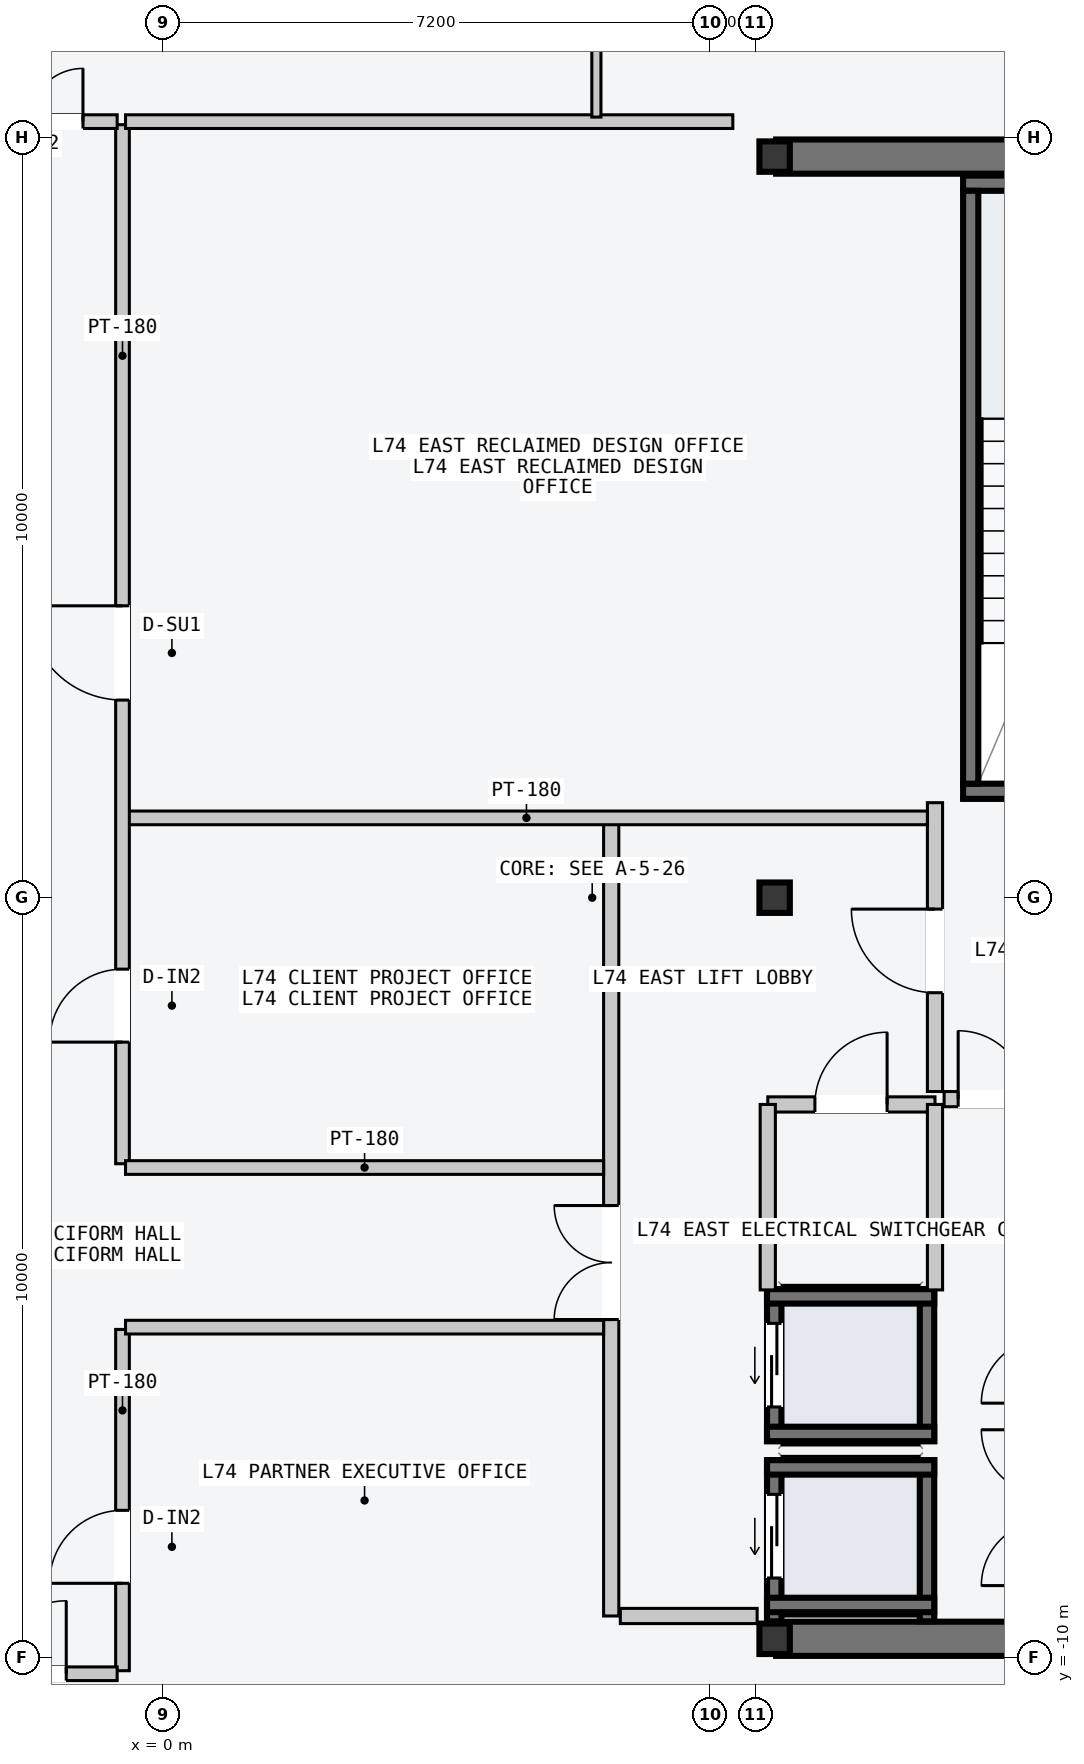
"""IFC4 building model, lengths in metres.
Left out: names, types, materials, properties, quantities, classifications, styles, units other than length and angle.
Written with IfcOpenShell. Run it as: python <this file> out.ifc"""

import sys

from ifc_helpers import new_model, si_unit, direction, frame, frame_2d, origin, origin_2d, place, context, subcontext, project, spatial, rectangle, i_section, extrude, element, fill, save


model = new_model("IFC4")
c1 = context("Model", 3, precision=1e-05, world=origin(), true_north=direction((0.0, 1.0)))
c2 = subcontext(c1, "Body", "Model", "MODEL_VIEW")
j1 = project(units=[si_unit("LENGTHUNIT", "METRE"), si_unit("PLANEANGLEUNIT", "RADIAN")], contexts=[c1])
p1 = place(None, origin())
s1 = spatial("IfcSite", under=j1, at=p1, CompositionType="ELEMENT")
p2 = place(p1, origin())
s2 = spatial("IfcBuilding", under=s1, at=p2, CompositionType="ELEMENT")
p3 = place(p2, frame((0.0, 0.0, 280.8)))
s3 = spatial("IfcBuildingStorey", under=s2, at=p3, CompositionType="ELEMENT", Elevation=280.8)
for number, where, z_axis, x_axis in (
    (1, (8.07, -9.75, -0.2), (0.0, 0.0, 1.0), (1.0, 0.0, 0.0)),
    (2, (8.07, 9.75, -0.2), (0.0, 0.0, 1.0), (1.0, 0.0, 0.0)),
):
    element("IfcWall", number, at=place(p3, frame(where, z_axis=z_axis, x_axis=x_axis)), inside=s3, PredefinedType="SHEAR", context=c2, shape_type="SweptSolid", body=[
        extrude(rectangle(XDim=6.46, YDim=0.45, at=frame_2d((3.23, 0.0))), origin(), (0.0, 0.0, 1.0), 3.6),
    ])
p4 = place(p3, frame((10.53, 1.4, -0.2), z_axis=(0.0, 0.0, 1.0), x_axis=(1.0, 0.0, 0.0)))
e3 = element("IfcWall", 3, at=p4, inside=s3, PredefinedType="SOLIDWALL", context=c2, shape_type="SweptSolid", body=[
    extrude(rectangle(XDim=3.72, YDim=0.2, at=frame_2d((1.86, 0.0))), origin(), (0.0, 0.0, 1.0), 3.6),
])
p5 = place(p4, frame((1.5, 0.0, 0.2)))
e4 = element("IfcOpeningElement", 4, at=p5, cuts=e3, PredefinedType="OPENING", context=c2, shape_type="SweptSolid", body=[
    extrude(rectangle(XDim=1.12, YDim=2.18, at=frame_2d((0.56, 1.09))), frame((0.0, 0.11, 0.0), z_axis=(0.0, -1.0, 0.0), x_axis=(1.0, 0.0, 0.0)), (0.0, 0.0, 1.0), 0.22),
])
p6 = place(p3, frame((10.53, 9.4, -0.2), z_axis=(0.0, 0.0, 1.0), x_axis=(1.0, 0.0, 0.0)))
e5 = element("IfcWall", 5, at=p6, inside=s3, PredefinedType="SOLIDWALL", context=c2, shape_type="SweptSolid", body=[
    extrude(rectangle(XDim=3.72, YDim=0.2, at=frame_2d((1.86, 0.0))), origin(), (0.0, 0.0, 1.0), 3.6),
])
p7 = place(p3, frame((10.63, 1.5, -0.2), z_axis=(0.0, 0.0, 1.0), x_axis=(0.0, 1.0, 0.0)))
e6 = element("IfcWall", 6, at=p7, inside=s3, PredefinedType="SOLIDWALL", context=c2, shape_type="SweptSolid", body=[
    extrude(rectangle(XDim=7.8, YDim=0.2, at=frame_2d((3.9, 0.0))), origin(), (0.0, 0.0, 1.0), 3.6),
])
for number, where, z_axis, x_axis in (
    (7, (8.05, -9.75, 0.0), (0.0, 0.0, 1.0), (1.0, 0.0, 0.0)),
    (8, (8.05, 0.0, 0.0), (0.0, 0.0, 1.0), (1.0, 0.0, 0.0)),
    (9, (8.05, 9.75, 0.0), (0.0, 0.0, 1.0), (1.0, 0.0, 0.0)),
):
    element("IfcColumn", number, at=place(p3, frame(where, z_axis=z_axis, x_axis=x_axis)), inside=s3, PredefinedType="COLUMN", context=c2, shape_type="SweptSolid", body=[
        extrude(i_section(OverallWidth=0.4, OverallDepth=0.4, WebThickness=0.013, FlangeThickness=0.021, at=origin_2d()), origin(), (0.0, 0.0, 1.0), 3.6),
    ])
p8 = place(p3, frame((8.045, -9.52, -0.2), z_axis=(0.0, 0.0, 1.0), x_axis=(0.0, 1.0, 0.0)))
e10 = element("IfcWall", 10, at=p8, inside=s3, PredefinedType="SOLIDWALL", context=c2, shape_type="SweptSolid", body=[
    extrude(rectangle(XDim=2.12, YDim=0.19, at=frame_2d((1.06, 0.0))), origin(), (0.0, 0.0, 1.0), 3.6),
])
p9 = place(p8, frame((0.57, 0.0, 0.2)))
e11 = element("IfcOpeningElement", 11, at=p9, cuts=e10, PredefinedType="OPENING", context=c2, shape_type="SweptSolid", body=[
    extrude(rectangle(XDim=1.1, YDim=2.2, at=frame_2d((0.55, 1.1))), frame((0.0, 0.105, 0.0), z_axis=(0.0, -1.0, 0.0), x_axis=(1.0, 0.0, 0.0)), (0.0, 0.0, 1.0), 0.21),
])
p10 = place(p3, frame((10.055, -9.52, -0.2), z_axis=(0.0, 0.0, 1.0), x_axis=(0.0, 1.0, 0.0)))
e12 = element("IfcWall", 12, at=p10, inside=s3, PredefinedType="SOLIDWALL", context=c2, shape_type="SweptSolid", body=[
    extrude(rectangle(XDim=2.12, YDim=0.19, at=frame_2d((1.06, 0.0))), origin(), (0.0, 0.0, 1.0), 3.6),
])
for number, where, z_axis, x_axis in (
    (13, (7.95, -7.495, -0.2), (0.0, 0.0, 1.0), (1.0, 0.0, 0.0)),
    (14, (7.95, -9.305, -0.2), (0.0, 0.0, 1.0), (1.0, 0.0, 0.0)),
):
    element("IfcWall", number, at=place(p3, frame(where, z_axis=z_axis, x_axis=x_axis)), inside=s3, PredefinedType="SOLIDWALL", context=c2, shape_type="SweptSolid", body=[
        extrude(rectangle(XDim=2.2, YDim=0.19, at=frame_2d((1.1, 0.0))), origin(), (0.0, 0.0, 1.0), 3.6),
    ])
p11 = place(p3, frame((8.045, -7.15, -0.2), z_axis=(0.0, 0.0, 1.0), x_axis=(0.0, 1.0, 0.0)))
e15 = element("IfcWall", 15, at=p11, inside=s3, PredefinedType="SOLIDWALL", context=c2, shape_type="SweptSolid", body=[
    extrude(rectangle(XDim=2.0, YDim=0.19, at=frame_2d((1.0, 0.0))), origin(), (0.0, 0.0, 1.0), 3.6),
])
p12 = place(p11, frame((0.45, 0.0, 0.2)))
e16 = element("IfcOpeningElement", 16, at=p12, cuts=e15, PredefinedType="OPENING", context=c2, shape_type="SweptSolid", body=[
    extrude(rectangle(XDim=1.1, YDim=2.2, at=frame_2d((0.55, 1.1))), frame((0.0, 0.105, 0.0), z_axis=(0.0, -1.0, 0.0), x_axis=(1.0, 0.0, 0.0)), (0.0, 0.0, 1.0), 0.21),
])
p13 = place(p3, frame((10.055, -7.15, -0.2), z_axis=(0.0, 0.0, 1.0), x_axis=(0.0, 1.0, 0.0)))
e17 = element("IfcWall", 17, at=p13, inside=s3, PredefinedType="SOLIDWALL", context=c2, shape_type="SweptSolid", body=[
    extrude(rectangle(XDim=2.0, YDim=0.19, at=frame_2d((1.0, 0.0))), origin(), (0.0, 0.0, 1.0), 3.6),
])
for number, where, z_axis, x_axis in (
    (18, (7.95, -5.245, -0.2), (0.0, 0.0, 1.0), (1.0, 0.0, 0.0)),
    (19, (7.95, -7.055, -0.2), (0.0, 0.0, 1.0), (1.0, 0.0, 0.0)),
):
    element("IfcWall", number, at=place(p3, frame(where, z_axis=z_axis, x_axis=x_axis)), inside=s3, PredefinedType="SOLIDWALL", context=c2, shape_type="SweptSolid", body=[
        extrude(rectangle(XDim=2.2, YDim=0.19, at=frame_2d((1.1, 0.0))), origin(), (0.0, 0.0, 1.0), 3.6),
    ])
p14 = place(p3, frame((5.9, -9.45, 0.0), z_axis=(0.0, 0.0, 1.0), x_axis=(0.0, 1.0, 0.0)))
e20 = element("IfcWall", 20, at=p14, inside=s3, PredefinedType="PARTITIONING", context=c2, shape_type="SweptSolid", body=[
    extrude(rectangle(XDim=10.5, YDim=0.2, at=frame_2d((5.25, 0.0))), origin(), (0.0, 0.0, 1.0), 3.4),
])
p15 = place(p14, frame((3.9, 0.0, 0.0)))
e21 = element("IfcOpeningElement", 21, at=p15, cuts=e20, PredefinedType="OPENING", context=c2, shape_type="SweptSolid", body=[
    extrude(rectangle(XDim=1.5, YDim=2.2, at=frame_2d((0.75, 1.1))), frame((0.0, 0.11, 0.0), z_axis=(0.0, -1.0, 0.0), x_axis=(1.0, 0.0, 0.0)), (0.0, 0.0, 1.0), 0.22),
])
p16 = place(p3, frame((6.02, -9.45, 0.0), z_axis=(0.0, 0.0, 1.0), x_axis=(1.0, 0.0, 0.0)))
e22 = element("IfcWall", 22, at=p16, inside=s3, PredefinedType="PARTITIONING", context=c2, shape_type="SweptSolid", body=[
    extrude(rectangle(XDim=1.8, YDim=0.2, at=frame_2d((0.9, 0.0))), origin(), (0.0, 0.0, 1.0), 3.4),
])
p17 = place(p3, frame((10.16, -2.55, 0.0), z_axis=(0.0, 0.0, 1.0), x_axis=(0.0, 1.0, 0.0)))
e23 = element("IfcWall", 23, at=p17, inside=s3, PredefinedType="PARTITIONING", context=c2, shape_type="SweptSolid", body=[
    extrude(rectangle(XDim=3.8, YDim=0.2, at=frame_2d((1.9, 0.0))), origin(), (0.0, 0.0, 1.0), 3.4),
])
p18 = place(p17, frame((1.3, 0.0, 0.0)))
e24 = element("IfcOpeningElement", 24, at=p18, cuts=e23, PredefinedType="OPENING", context=c2, shape_type="SweptSolid", body=[
    extrude(rectangle(XDim=1.1, YDim=2.15, at=frame_2d((0.55, 1.075))), frame((0.0, 0.11, 0.0), z_axis=(0.0, -1.0, 0.0), x_axis=(1.0, 0.0, 0.0)), (0.0, 0.0, 1.0), 0.22),
])
p19 = place(p3, frame((10.28, -2.65, 0.0), z_axis=(0.0, 0.0, 1.0), x_axis=(1.0, 0.0, 0.0)))
e25 = element("IfcWall", 25, at=p19, inside=s3, PredefinedType="PARTITIONING", context=c2, shape_type="SweptSolid", body=[
    extrude(rectangle(XDim=1.27, YDim=0.2, at=frame_2d((0.635, 0.0))), origin(), (0.0, 0.0, 1.0), 3.4),
])
p20 = place(p19, frame((0.185, 0.0, 0.0)))
e26 = element("IfcOpeningElement", 26, at=p20, cuts=e25, PredefinedType="OPENING", context=c2, shape_type="SweptSolid", body=[
    extrude(rectangle(XDim=0.9, YDim=2.15, at=frame_2d((0.45, 1.075))), frame((0.0, 0.11, 0.0), z_axis=(0.0, -1.0, 0.0), x_axis=(1.0, 0.0, 0.0)), (0.0, 0.0, 1.0), 0.22),
])
p21 = place(p3, frame((7.96, -2.72, 0.0), z_axis=(0.0, 0.0, 1.0), x_axis=(1.0, 0.0, 0.0)))
e27 = element("IfcWall", 27, at=p21, inside=s3, PredefinedType="PARTITIONING", context=c2, shape_type="SweptSolid", body=[
    extrude(rectangle(XDim=2.2, YDim=0.2, at=frame_2d((1.1, 0.0))), origin(), (0.0, 0.0, 1.0), 3.4),
])
p22 = place(p21, frame((0.62, 0.0, 0.0)))
e28 = element("IfcOpeningElement", 28, at=p22, cuts=e27, PredefinedType="OPENING", context=c2, shape_type="SweptSolid", body=[
    extrude(rectangle(XDim=0.95, YDim=2.1, at=frame_2d((0.475, 1.05))), frame((0.0, 0.11, 0.0), z_axis=(0.0, -1.0, 0.0), x_axis=(1.0, 0.0, 0.0)), (0.0, 0.0, 1.0), 0.22),
])
for number, where, z_axis, x_axis in (
    (29, (7.96, -5.16, 0.0), (0.0, 0.0, 1.0), (0.0, 1.0, 0.0)),
    (30, (10.16, -5.16, 0.0), (0.0, 0.0, 1.0), (0.0, 1.0, 0.0)),
):
    element("IfcWall", number, at=place(p3, frame(where, z_axis=z_axis, x_axis=x_axis)), inside=s3, PredefinedType="PARTITIONING", context=c2, shape_type="SweptSolid", body=[
        extrude(rectangle(XDim=2.44, YDim=0.2, at=frame_2d((1.22, 0.0))), origin(), (0.0, 0.0, 1.0), 3.4),
    ])
p23 = place(p3, frame((-0.49, 1.05, 0.0), z_axis=(0.0, 0.0, 1.0), x_axis=(1.0, 0.0, 0.0)))
e31 = element("IfcWall", 31, at=p23, inside=s3, PredefinedType="PARTITIONING", context=c2, shape_type="SweptSolid", body=[
    extrude(rectangle(XDim=10.55, YDim=0.18, at=frame_2d((5.275, 0.0))), origin(), (0.0, 0.0, 1.0), 3.4),
])
p24 = place(p3, frame((-0.53, -3.5, 0.0), z_axis=(0.0, 0.0, 1.0), x_axis=(0.0, 1.0, 0.0)))
e32 = element("IfcWall", 32, at=p24, inside=s3, PredefinedType="PARTITIONING", context=c2, shape_type="SweptSolid", body=[
    extrude(rectangle(XDim=13.67, YDim=0.18, at=frame_2d((6.835, 0.0))), origin(), (0.0, 0.0, 1.0), 3.4),
])
p25 = place(p24, frame((6.1, 0.0, 0.0)))
e33 = element("IfcOpeningElement", 33, at=p25, cuts=e32, PredefinedType="OPENING", context=c2, shape_type="SweptSolid", body=[
    extrude(rectangle(XDim=1.24, YDim=2.24, at=frame_2d((0.62, 1.12))), frame((0.0, 0.1, 0.0), z_axis=(0.0, -1.0, 0.0), x_axis=(1.0, 0.0, 0.0)), (0.0, 0.0, 1.0), 0.2),
])
p26 = place(p24, frame((1.6, 0.0, 0.0)))
e34 = element("IfcOpeningElement", 34, at=p26, cuts=e32, PredefinedType="OPENING", context=c2, shape_type="SweptSolid", body=[
    extrude(rectangle(XDim=0.96, YDim=2.18, at=frame_2d((0.48, 1.09))), frame((0.0, 0.1, 0.0), z_axis=(0.0, -1.0, 0.0), x_axis=(1.0, 0.0, 0.0)), (0.0, 0.0, 1.0), 0.2),
])
p27 = place(p3, frame((-0.49, 10.21, 0.0), z_axis=(0.0, 0.0, 1.0), x_axis=(1.0, 0.0, 0.0)))
e35 = element("IfcWall", 35, at=p27, inside=s3, PredefinedType="PARTITIONING", context=c2, shape_type="SweptSolid", body=[
    extrude(rectangle(XDim=7.99, YDim=0.18, at=frame_2d((3.995, 0.0))), origin(), (0.0, 0.0, 1.0), 3.4),
])
p28 = place(p3, frame((-0.49, -3.55, 0.0), z_axis=(0.0, 0.0, 1.0), x_axis=(1.0, 0.0, 0.0)))
e36 = element("IfcWall", 36, at=p28, inside=s3, PredefinedType="PARTITIONING", context=c2, shape_type="SweptSolid", body=[
    extrude(rectangle(XDim=6.29, YDim=0.18, at=frame_2d((3.145, 0.0))), origin(), (0.0, 0.0, 1.0), 3.4),
])
p29 = place(p3, frame((-0.53, -10.17, 0.0), z_axis=(0.0, 0.0, 1.0), x_axis=(0.0, 1.0, 0.0)))
e37 = element("IfcWall", 37, at=p29, inside=s3, PredefinedType="PARTITIONING", context=c2, shape_type="SweptSolid", body=[
    extrude(rectangle(XDim=4.49, YDim=0.18, at=frame_2d((2.245, 0.0))), origin(), (0.0, 0.0, 1.0), 3.4),
])
p30 = place(p29, frame((1.15, 0.0, 0.0)))
e38 = element("IfcOpeningElement", 38, at=p30, cuts=e37, PredefinedType="OPENING", context=c2, shape_type="SweptSolid", body=[
    extrude(rectangle(XDim=0.96, YDim=2.18, at=frame_2d((0.48, 1.09))), frame((0.0, 0.1, 0.0), z_axis=(0.0, -1.0, 0.0), x_axis=(1.0, 0.0, 0.0)), (0.0, 0.0, 1.0), 0.2),
])
p31 = place(p3, frame((-0.49, -5.65, 0.0), z_axis=(0.0, 0.0, 1.0), x_axis=(1.0, 0.0, 0.0)))
e39 = element("IfcWall", 39, at=p31, inside=s3, PredefinedType="PARTITIONING", context=c2, shape_type="SweptSolid", body=[
    extrude(rectangle(XDim=6.29, YDim=0.18, at=frame_2d((3.145, 0.0))), origin(), (0.0, 0.0, 1.0), 3.4),
])
p32 = place(p3, frame((5.705, 10.27, 0.0), z_axis=(0.0, 0.0, 1.0), x_axis=(0.0, 1.0, 0.0)))
e40 = element("IfcWall", 40, at=p32, inside=s3, PredefinedType="PARTITIONING", context=c2, shape_type="SweptSolid", body=[
    extrude(rectangle(XDim=7.29, YDim=0.12, at=frame_2d((3.645, 0.0))), origin(), (0.0, 0.0, 1.0), 3.4),
])
p33 = place(p32, frame((1.15, 0.0, 0.0)))
e41 = element("IfcOpeningElement", 41, at=p33, cuts=e40, PredefinedType="OPENING", context=c2, shape_type="SweptSolid", body=[
    extrude(rectangle(XDim=0.96, YDim=2.18, at=frame_2d((0.48, 1.09))), frame((0.0, 0.07, 0.0), z_axis=(0.0, -1.0, 0.0), x_axis=(1.0, 0.0, 0.0)), (0.0, 0.0, 1.0), 0.14),
])
p34 = place(p3, frame((-2.9, 10.21, 0.0), z_axis=(0.0, 0.0, 1.0), x_axis=(1.0, 0.0, 0.0)))
e42 = element("IfcWall", 42, at=p34, inside=s3, PredefinedType="PARTITIONING", context=c2, shape_type="SweptSolid", body=[
    extrude(rectangle(XDim=2.3, YDim=0.18, at=frame_2d((1.15, 0.0))), origin(), (0.0, 0.0, 1.0), 3.4),
])
p35 = place(p34, frame((0.45, 0.0, 0.0)))
e43 = element("IfcOpeningElement", 43, at=p35, cuts=e42, PredefinedType="OPENING", context=c2, shape_type="SweptSolid", body=[
    extrude(rectangle(XDim=1.4, YDim=2.2, at=frame_2d((0.7, 1.1))), frame((0.0, 0.1, 0.0), z_axis=(0.0, -1.0, 0.0), x_axis=(1.0, 0.0, 0.0)), (0.0, 0.0, 1.0), 0.2),
])
p36 = place(p3, frame((-2.9, -10.21, 0.0), z_axis=(0.0, 0.0, 1.0), x_axis=(1.0, 0.0, 0.0)))
e44 = element("IfcWall", 44, at=p36, inside=s3, PredefinedType="PARTITIONING", context=c2, shape_type="SweptSolid", body=[
    extrude(rectangle(XDim=2.3, YDim=0.18, at=frame_2d((1.15, 0.0))), origin(), (0.0, 0.0, 1.0), 3.4),
])
p37 = place(p36, frame((0.67, 0.0, 0.0)))
e45 = element("IfcOpeningElement", 45, at=p37, cuts=e44, PredefinedType="OPENING", context=c2, shape_type="SweptSolid", body=[
    extrude(rectangle(XDim=0.96, YDim=2.18, at=frame_2d((0.48, 1.09))), frame((0.0, 0.1, 0.0), z_axis=(0.0, -1.0, 0.0), x_axis=(1.0, 0.0, 0.0)), (0.0, 0.0, 1.0), 0.2),
])
p38 = place(p9, origin())
e46 = element("IfcDoor", 46, at=p38, inside=s3, OperationType="SLIDING_TO_LEFT", PredefinedType="DOOR", context=c2, shape_type="SweptSolid", body=[
    extrude(rectangle(XDim=1.1, YDim=2.2, at=frame_2d((0.55, 1.1))), frame((0.0, 0.025, 0.0), z_axis=(0.0, -1.0, 0.0), x_axis=(1.0, 0.0, 0.0)), (0.0, 0.0, 1.0), 0.05),
])
fill(e11, e46)
p39 = place(p12, origin())
e47 = element("IfcDoor", 47, at=p39, inside=s3, OperationType="SLIDING_TO_LEFT", PredefinedType="DOOR", context=c2, shape_type="SweptSolid", body=[
    extrude(rectangle(XDim=1.1, YDim=2.2, at=frame_2d((0.55, 1.1))), frame((0.0, 0.025, 0.0), z_axis=(0.0, -1.0, 0.0), x_axis=(1.0, 0.0, 0.0)), (0.0, 0.0, 1.0), 0.05),
])
fill(e16, e47)
p40 = place(p15, origin())
e48 = element("IfcDoor", 48, at=p40, inside=s3, OperationType="DOUBLE_DOOR_SINGLE_SWING", PredefinedType="DOOR", context=c2, shape_type="SweptSolid", body=[
    extrude(rectangle(XDim=1.5, YDim=2.2, at=frame_2d((0.75, 1.1))), frame((0.0, 0.025, 0.0), z_axis=(0.0, -1.0, 0.0), x_axis=(1.0, 0.0, 0.0)), (0.0, 0.0, 1.0), 0.05),
])
fill(e21, e48)
p41 = place(p18, origin())
e49 = element("IfcDoor", 49, at=p41, inside=s3, OperationType="SINGLE_SWING_RIGHT", PredefinedType="DOOR", context=c2, shape_type="SweptSolid", body=[
    extrude(rectangle(XDim=1.1, YDim=2.15, at=frame_2d((0.55, 1.075))), frame((0.0, 0.025, 0.0), z_axis=(0.0, -1.0, 0.0), x_axis=(1.0, 0.0, 0.0)), (0.0, 0.0, 1.0), 0.05),
])
fill(e24, e49)
p42 = place(p20, origin())
e50 = element("IfcDoor", 50, at=p42, inside=s3, OperationType="SINGLE_SWING_LEFT", PredefinedType="DOOR", context=c2, shape_type="SweptSolid", body=[
    extrude(rectangle(XDim=0.9, YDim=2.15, at=frame_2d((0.45, 1.075))), frame((0.0, 0.025, 0.0), z_axis=(0.0, -1.0, 0.0), x_axis=(1.0, 0.0, 0.0)), (0.0, 0.0, 1.0), 0.05),
])
fill(e26, e50)
p43 = place(p22, origin())
e51 = element("IfcDoor", 51, at=p43, inside=s3, OperationType="SINGLE_SWING_RIGHT", PredefinedType="DOOR", context=c2, shape_type="SweptSolid", body=[
    extrude(rectangle(XDim=0.95, YDim=2.1, at=frame_2d((0.475, 1.05))), frame((0.0, 0.025, 0.0), z_axis=(0.0, -1.0, 0.0), x_axis=(1.0, 0.0, 0.0)), (0.0, 0.0, 1.0), 0.05),
])
fill(e28, e51)
p44 = place(p25, origin())
e52 = element("IfcDoor", 52, at=p44, inside=s3, OperationType="SINGLE_SWING_RIGHT", PredefinedType="DOOR", context=c2, shape_type="SweptSolid", body=[
    extrude(rectangle(XDim=1.24, YDim=2.24, at=frame_2d((0.62, 1.12))), frame((0.0, 0.025, 0.0), z_axis=(0.0, -1.0, 0.0), x_axis=(1.0, 0.0, 0.0)), (0.0, 0.0, 1.0), 0.05),
])
fill(e33, e52)
p45 = place(p26, origin())
e53 = element("IfcDoor", 53, at=p45, inside=s3, OperationType="SINGLE_SWING_LEFT", PredefinedType="DOOR", context=c2, shape_type="SweptSolid", body=[
    extrude(rectangle(XDim=0.96, YDim=2.18, at=frame_2d((0.48, 1.09))), frame((0.0, 0.025, 0.0), z_axis=(0.0, -1.0, 0.0), x_axis=(1.0, 0.0, 0.0)), (0.0, 0.0, 1.0), 0.05),
])
fill(e34, e53)
p46 = place(p30, origin())
e54 = element("IfcDoor", 54, at=p46, inside=s3, OperationType="SINGLE_SWING_LEFT", PredefinedType="DOOR", context=c2, shape_type="SweptSolid", body=[
    extrude(rectangle(XDim=0.96, YDim=2.18, at=frame_2d((0.48, 1.09))), frame((0.0, 0.025, 0.0), z_axis=(0.0, -1.0, 0.0), x_axis=(1.0, 0.0, 0.0)), (0.0, 0.0, 1.0), 0.05),
])
fill(e38, e54)
p47 = place(p35, origin())
e55 = element("IfcDoor", 55, at=p47, inside=s3, OperationType="DOUBLE_DOOR_SINGLE_SWING", PredefinedType="DOOR", context=c2, shape_type="SweptSolid", body=[
    extrude(rectangle(XDim=1.4, YDim=2.2, at=frame_2d((0.7, 1.1))), frame((0.0, 0.025, 0.0), z_axis=(0.0, -1.0, 0.0), x_axis=(1.0, 0.0, 0.0)), (0.0, 0.0, 1.0), 0.05),
])
fill(e43, e55)
p48 = place(p37, origin())
e56 = element("IfcDoor", 56, at=p48, inside=s3, OperationType="SINGLE_SWING_RIGHT", PredefinedType="DOOR", context=c2, shape_type="SweptSolid", body=[
    extrude(rectangle(XDim=0.96, YDim=2.18, at=frame_2d((0.48, 1.09))), frame((0.0, 0.025, 0.0), z_axis=(0.0, -1.0, 0.0), x_axis=(1.0, 0.0, 0.0)), (0.0, 0.0, 1.0), 0.05),
])
fill(e45, e56)
save(model, sys.argv[1])
